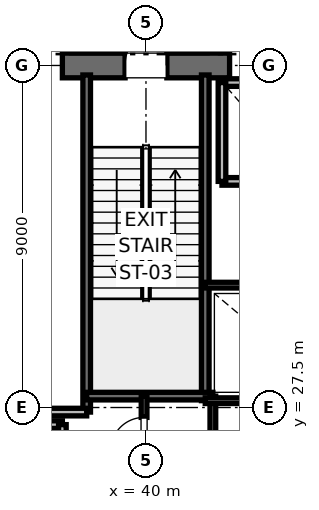
"""IFC4 building model, lengths in metres.
Left out: names, types, materials, properties, quantities, classifications, styles, units other than length and angle.
Written with IfcOpenShell. Run it as: python <this file> out.ifc"""

import sys

from ifc_helpers import new_model, si_unit, direction, frame, frame_2d, origin, place, context, subcontext, project, spatial, rectangle, extrude, element, fill, save


model = new_model("IFC4")
c1 = context("Model", 3, precision=1e-05, world=origin(), true_north=direction((0.0, 1.0)))
c2 = subcontext(c1, "Body", "Model", "MODEL_VIEW")
j1 = project(units=[si_unit("LENGTHUNIT", "METRE"), si_unit("PLANEANGLEUNIT", "RADIAN")], contexts=[c1])
p1 = place(None, origin())
s1 = spatial("IfcSite", under=j1, at=p1, CompositionType="ELEMENT")
p2 = place(p1, origin())
s2 = spatial("IfcBuilding", under=s1, at=p2, CompositionType="ELEMENT")
p3 = place(p2, frame((0.0, 0.0, 16.4)))
s3 = spatial("IfcBuildingStorey", under=s2, at=p3, CompositionType="ELEMENT", Elevation=16.4)
p4 = place(p3, frame((37.8, 36.5, 0.0), z_axis=(0.0, 0.0, 1.0), x_axis=(1.0, 0.0, 0.0)))
e1 = element("IfcWall", 1, at=p4, inside=s3, PredefinedType="SHEAR", context=c2, shape_type="SweptSolid", body=[
    extrude(rectangle(XDim=4.4, YDim=0.65, at=frame_2d((2.2, 0.0))), origin(), (0.0, 0.0, 1.0), 4.9),
])
p5 = place(p4, frame((1.65, 0.0, 0.0)))
e2 = element("IfcOpeningElement", 2, at=p5, cuts=e1, PredefinedType="OPENING", context=c2, shape_type="SweptSolid", body=[
    extrude(rectangle(XDim=1.1, YDim=2.15, at=frame_2d((0.55, 1.075))), frame((0.0, 0.325, 0.0), z_axis=(0.0, -1.0, 0.0), x_axis=(1.0, 0.0, 0.0)), (0.0, 0.0, 1.0), 0.65),
])
p6 = place(p3, frame((38.44, 27.38, 0.0), z_axis=(0.0, 0.0, 1.0), x_axis=(0.0, 1.0, 0.0)))
e3 = element("IfcWall", 3, at=p6, inside=s3, PredefinedType="SOLIDWALL", context=c2, shape_type="SweptSolid", body=[
    extrude(rectangle(XDim=8.87, YDim=0.2, at=frame_2d((4.435, 0.0))), origin(), (0.0, 0.0, 1.0), 4.9),
])
p7 = place(p3, frame((41.56, 27.68, 0.0), z_axis=(0.0, 0.0, 1.0), x_axis=(0.0, 1.0, 0.0)))
e4 = element("IfcWall", 4, at=p7, inside=s3, PredefinedType="SOLIDWALL", context=c2, shape_type="SweptSolid", body=[
    extrude(rectangle(XDim=8.57, YDim=0.2, at=frame_2d((4.285, 0.0))), origin(), (0.0, 0.0, 1.0), 4.9),
])
p8 = place(p3, frame((38.44, 27.8, 0.0), z_axis=(0.0, 0.0, 1.0), x_axis=(1.0, 0.0, 0.0)))
e5 = element("IfcWall", 5, at=p8, inside=s3, PredefinedType="SOLIDWALL", context=c2, shape_type="SweptSolid", body=[
    extrude(rectangle(XDim=3.32, YDim=0.2, at=frame_2d((1.66, 0.0))), origin(), (0.0, 0.0, 1.0), 4.9),
])
p9 = place(p3, frame((32.82, 27.38, 0.0), z_axis=(0.0, 0.0, 1.0), x_axis=(1.0, 0.0, 0.0)))
e6 = element("IfcWall", 6, at=p9, inside=s3, PredefinedType="PARTITIONING", context=c2, shape_type="SweptSolid", body=[
    extrude(rectangle(XDim=5.62, YDim=0.2, at=frame_2d((2.81, 0.0))), origin(), (0.0, 0.0, 1.0), 4.9),
])
p10 = place(p3, frame((37.8, 27.05, 0.0), z_axis=(0.0, 0.0, 1.0), x_axis=(-1.0, 0.0, 0.0)))
e7 = element("IfcWall", 7, at=p10, inside=s3, PredefinedType="SOLIDWALL", context=c2, shape_type="SweptSolid", body=[
    extrude(rectangle(XDim=2.3, YDim=0.2, at=frame_2d((1.15, 0.0))), origin(), (0.0, 0.0, 1.0), 4.9),
])
p11 = place(p3, frame((37.8, 24.45, 0.0), z_axis=(0.0, 0.0, 1.0), x_axis=(0.0, 1.0, 0.0)))
e8 = element("IfcWall", 8, at=p11, inside=s3, PredefinedType="SOLIDWALL", context=c2, shape_type="SweptSolid", body=[
    extrude(rectangle(XDim=2.6, YDim=0.2, at=frame_2d((1.3, 0.0))), origin(), (0.0, 0.0, 1.0), 4.9),
])
p12 = place(p3, frame((42.0, 33.45, 0.0), z_axis=(0.0, 0.0, 1.0), x_axis=(1.0, 0.0, 0.0)))
e9 = element("IfcWall", 9, at=p12, inside=s3, PredefinedType="SOLIDWALL", context=c2, shape_type="SweptSolid", body=[
    extrude(rectangle(XDim=2.3, YDim=0.2, at=frame_2d((1.15, 0.0))), origin(), (0.0, 0.0, 1.0), 4.9),
])
p13 = place(p3, frame((44.3, 36.05, 0.0), z_axis=(0.0, 0.0, 1.0), x_axis=(-1.0, 0.0, 0.0)))
e10 = element("IfcWall", 10, at=p13, inside=s3, PredefinedType="SOLIDWALL", context=c2, shape_type="SweptSolid", body=[
    extrude(rectangle(XDim=2.3, YDim=0.2, at=frame_2d((1.15, 0.0))), origin(), (0.0, 0.0, 1.0), 3.68),
])
p14 = place(p3, frame((42.0, 36.05, 0.0), z_axis=(0.0, 0.0, 1.0), x_axis=(0.0, -1.0, 0.0)))
e11 = element("IfcWall", 11, at=p14, inside=s3, PredefinedType="SOLIDWALL", context=c2, shape_type="SweptSolid", body=[
    extrude(rectangle(XDim=2.6, YDim=0.2, at=frame_2d((1.3, 0.0))), origin(), (0.0, 0.0, 1.0), 3.68),
])
p15 = place(p3, frame((41.76, 23.8, 0.0), z_axis=(0.0, 0.0, 1.0), x_axis=(0.0, 1.0, 0.0)))
e12 = element("IfcWall", 12, at=p15, inside=s3, PredefinedType="PARTITIONING", context=c2, shape_type="SweptSolid", body=[
    extrude(rectangle(XDim=4.0, YDim=0.15, at=frame_2d((2.0, 0.0))), origin(), (0.0, 0.0, 1.0), 2.85),
])
p16 = place(p3, frame((39.95, 25.8, 0.0), z_axis=(0.0, 0.0, 1.0), x_axis=(0.0, 1.0, 0.0)))
e13 = element("IfcWall", 13, at=p16, inside=s3, PredefinedType="PARTITIONING", context=c2, shape_type="SweptSolid", body=[
    extrude(rectangle(XDim=2.0, YDim=0.15, at=frame_2d((1.0, 0.0))), origin(), (0.0, 0.0, 1.0), 2.85),
])
p17 = place(p16, frame((0.56, 0.0, 0.0)))
e14 = element("IfcOpeningElement", 14, at=p17, cuts=e13, PredefinedType="OPENING", context=c2, shape_type="SweptSolid", body=[
    extrude(rectangle(XDim=0.88, YDim=2.1, at=frame_2d((0.44, 1.05))), frame((0.0, 0.075, 0.0), z_axis=(0.0, -1.0, 0.0), x_axis=(1.0, 0.0, 0.0)), (0.0, 0.0, 1.0), 0.15),
])
p18 = place(p3, frame((41.56, 27.68, 0.0), z_axis=(0.0, 0.0, 1.0), x_axis=(1.0, 0.0, 0.0)))
e15 = element("IfcWall", 15, at=p18, inside=s3, PredefinedType="PARTITIONING", context=c2, shape_type="SweptSolid", body=[
    extrude(rectangle(XDim=3.59, YDim=0.15, at=frame_2d((1.795, 0.0))), origin(), (0.0, 0.0, 1.0), 2.85),
])
p19 = place(p3, frame((41.56, 30.72, 0.0), z_axis=(0.0, 0.0, 1.0), x_axis=(1.0, 0.0, 0.0)))
e16 = element("IfcWall", 16, at=p19, inside=s3, PredefinedType="PARTITIONING", context=c2, shape_type="SweptSolid", body=[
    extrude(rectangle(XDim=3.59, YDim=0.15, at=frame_2d((1.795, 0.0))), origin(), (0.0, 0.0, 1.0), 2.85),
])
p20 = place(p19, frame((1.355, 0.0, 0.0)))
e17 = element("IfcOpeningElement", 17, at=p20, cuts=e16, PredefinedType="OPENING", context=c2, shape_type="SweptSolid", body=[
    extrude(rectangle(XDim=0.88, YDim=2.1, at=frame_2d((0.44, 1.05))), frame((0.0, 0.075, 0.0), z_axis=(0.0, -1.0, 0.0), x_axis=(1.0, 0.0, 0.0)), (0.0, 0.0, 1.0), 0.15),
])
p21 = place(p5, origin())
e18 = element("IfcDoor", 18, at=p21, inside=s3, OperationType="SINGLE_SWING_RIGHT", PredefinedType="DOOR", context=c2, shape_type="SweptSolid", body=[
    extrude(rectangle(XDim=1.1, YDim=2.15, at=frame_2d((0.55, 1.075))), frame((0.0, 0.025, 0.0), z_axis=(0.0, -1.0, 0.0), x_axis=(1.0, 0.0, 0.0)), (0.0, 0.0, 1.0), 0.05),
])
fill(e2, e18)
p22 = place(p17, origin())
e19 = element("IfcDoor", 19, at=p22, inside=s3, OperationType="SINGLE_SWING_LEFT", PredefinedType="DOOR", context=c2, shape_type="SweptSolid", body=[
    extrude(rectangle(XDim=0.88, YDim=2.1, at=frame_2d((0.44, 1.05))), frame((0.0, 0.025, 0.0), z_axis=(0.0, -1.0, 0.0), x_axis=(1.0, 0.0, 0.0)), (0.0, 0.0, 1.0), 0.05),
])
fill(e14, e19)
save(model, sys.argv[1])
